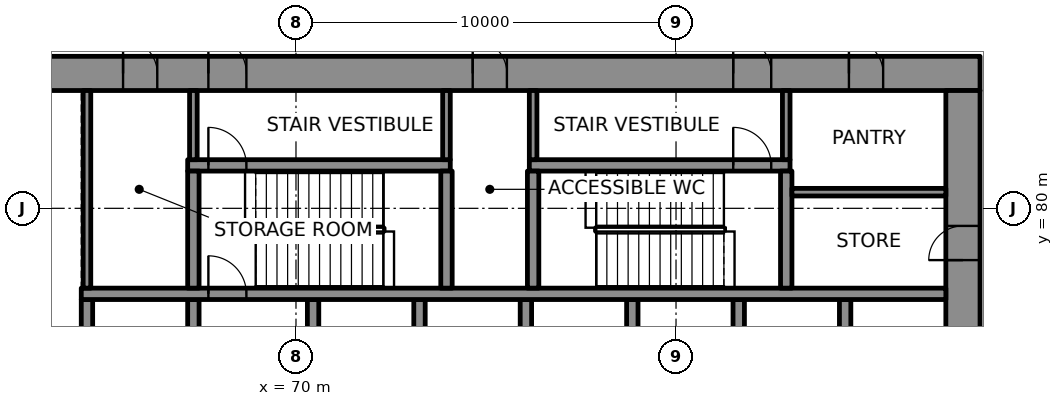
"""IFC4 building model, lengths in metres.
Left out: names, types, materials, properties, quantities, classifications, styles, units other than length and angle.
Written with IfcOpenShell. Run it as: python <this file> out.ifc"""

import sys

from ifc_helpers import new_model, si_unit, direction, frame, frame_2d, origin, place, context, subcontext, project, spatial, rectangle, extrude, element, fill, save


model = new_model("IFC4")
c1 = context("Model", 3, precision=1e-05, world=origin(), true_north=direction((0.0, 1.0)))
c2 = subcontext(c1, "Body", "Model", "MODEL_VIEW")
j1 = project(units=[si_unit("LENGTHUNIT", "METRE"), si_unit("PLANEANGLEUNIT", "RADIAN")], contexts=[c1])
p1 = place(None, origin())
s1 = spatial("IfcSite", under=j1, at=p1, CompositionType="ELEMENT")
p2 = place(p1, origin())
s2 = spatial("IfcBuilding", under=s1, at=p2, CompositionType="ELEMENT")
p3 = place(p2, frame((0.0, 0.0, 8.0)))
s3 = spatial("IfcBuildingStorey", under=s2, at=p3, CompositionType="ELEMENT", Elevation=8.0)
p4 = place(p3, frame((62.0, 83.55, 0.0), z_axis=(0.0, 0.0, 1.0), x_axis=(1.0, 0.0, 0.0)))
e1 = element("IfcWall", 1, at=p4, inside=s3, PredefinedType="SHEAR", context=c2, shape_type="SweptSolid", body=[
    extrude(rectangle(XDim=26.0, YDim=0.9, at=frame_2d((13.0, 0.0))), origin(), (0.0, 0.0, 1.0), 4.3),
])
p5 = place(p4, frame((5.695, 0.0, 0.0)))
e2 = element("IfcOpeningElement", 2, at=p5, cuts=e1, PredefinedType="OPENING", context=c2, shape_type="SweptSolid", body=[
    extrude(rectangle(XDim=1.0, YDim=2.1, at=frame_2d((0.5, 1.05))), frame((0.0, 0.46, 0.0), z_axis=(0.0, -1.0, 0.0), x_axis=(1.0, 0.0, 0.0)), (0.0, 0.0, 1.0), 0.92),
])
p6 = place(p4, frame((19.505, 0.0, 0.0)))
e3 = element("IfcOpeningElement", 3, at=p6, cuts=e1, PredefinedType="OPENING", context=c2, shape_type="SweptSolid", body=[
    extrude(rectangle(XDim=1.0, YDim=2.1, at=frame_2d((0.5, 1.05))), frame((0.0, 0.46, 0.0), z_axis=(0.0, -1.0, 0.0), x_axis=(1.0, 0.0, 0.0)), (0.0, 0.0, 1.0), 0.92),
])
p7 = place(p4, frame((3.45, 0.0, 0.0)))
e4 = element("IfcOpeningElement", 4, at=p7, cuts=e1, PredefinedType="OPENING", context=c2, shape_type="SweptSolid", body=[
    extrude(rectangle(XDim=0.9, YDim=2.1, at=frame_2d((0.45, 1.05))), frame((0.0, 0.46, 0.0), z_axis=(0.0, -1.0, 0.0), x_axis=(1.0, 0.0, 0.0)), (0.0, 0.0, 1.0), 0.92),
])
p8 = place(p4, frame((12.65, 0.0, 0.0)))
e5 = element("IfcOpeningElement", 5, at=p8, cuts=e1, PredefinedType="OPENING", context=c2, shape_type="SweptSolid", body=[
    extrude(rectangle(XDim=0.9, YDim=2.1, at=frame_2d((0.45, 1.05))), frame((0.0, 0.46, 0.0), z_axis=(0.0, -1.0, 0.0), x_axis=(1.0, 0.0, 0.0)), (0.0, 0.0, 1.0), 0.92),
])
p9 = place(p4, frame((22.55, 0.0, 0.0)))
e6 = element("IfcOpeningElement", 6, at=p9, cuts=e1, PredefinedType="OPENING", context=c2, shape_type="SweptSolid", body=[
    extrude(rectangle(XDim=0.9, YDim=2.1, at=frame_2d((0.45, 1.05))), frame((0.0, 0.46, 0.0), z_axis=(0.0, -1.0, 0.0), x_axis=(1.0, 0.0, 0.0)), (0.0, 0.0, 1.0), 0.92),
])
p10 = place(p3, frame((87.55, 66.9, 0.0), z_axis=(0.0, 0.0, 1.0), x_axis=(0.0, 1.0, 0.0)))
e7 = element("IfcWall", 7, at=p10, inside=s3, PredefinedType="SHEAR", context=c2, shape_type="SweptSolid", body=[
    extrude(rectangle(XDim=16.2, YDim=0.9, at=frame_2d((8.1, 0.0))), origin(), (0.0, 0.0, 1.0), 4.3),
])
p11 = place(p10, frame((5.5, 0.0, 0.0)))
e8 = element("IfcOpeningElement", 8, at=p11, cuts=e7, PredefinedType="OPENING", context=c2, shape_type="SweptSolid", body=[
    extrude(rectangle(XDim=1.8, YDim=2.1, at=frame_2d((0.9, 1.05))), frame((0.0, 0.46, 0.0), z_axis=(0.0, -1.0, 0.0), x_axis=(1.0, 0.0, 0.0)), (0.0, 0.0, 1.0), 0.92),
])
p12 = place(p10, frame((11.738, 0.0, 0.0)))
e9 = element("IfcOpeningElement", 9, at=p12, cuts=e7, PredefinedType="OPENING", context=c2, shape_type="SweptSolid", body=[
    extrude(rectangle(XDim=0.9, YDim=2.1, at=frame_2d((0.45, 1.05))), frame((0.0, 0.46, 0.0), z_axis=(0.0, -1.0, 0.0), x_axis=(1.0, 0.0, 0.0)), (0.0, 0.0, 1.0), 0.92),
])
for number, where, z_axis, x_axis in (
    (10, (64.5, 75.0, 0.0), (0.0, 0.0, 1.0), (0.0, 1.0, 0.0)),
    (11, (67.3, 75.0, 0.0), (0.0, 0.0, 1.0), (0.0, 1.0, 0.0)),
):
    element("IfcWall", number, at=place(p3, frame(where, z_axis=z_axis, x_axis=x_axis)), inside=s3, PredefinedType="SHEAR", context=c2, shape_type="SweptSolid", body=[
        extrude(rectangle(XDim=2.6, YDim=0.3, at=frame_2d((1.3, 0.0))), origin(), (0.0, 0.0, 1.0), 4.3),
    ])
p13 = place(p3, frame((70.45, 75.0, 0.0), z_axis=(0.0, 0.0, 1.0), x_axis=(0.0, 1.0, 0.0)))
e12 = element("IfcWall", 12, at=p13, inside=s3, PredefinedType="SHEAR", context=c2, shape_type="SweptSolid", body=[
    extrude(rectangle(XDim=2.6, YDim=0.3, at=frame_2d((1.3, 0.0))), origin(), (0.0, 0.0, 1.0), 4.3),
])
p14 = place(p13, frame((0.15, 0.0, 0.0)))
e13 = element("IfcOpeningElement", 13, at=p14, cuts=e12, PredefinedType="OPENING", context=c2, shape_type="SweptSolid", body=[
    extrude(rectangle(XDim=1.1, YDim=2.1, at=frame_2d((0.55, 1.05))), frame((0.0, 0.16, 0.0), z_axis=(0.0, -1.0, 0.0), x_axis=(1.0, 0.0, 0.0)), (0.0, 0.0, 1.0), 0.32),
])
for number, where, z_axis, x_axis in (
    (14, (73.25, 75.0, 0.0), (0.0, 0.0, 1.0), (0.0, 1.0, 0.0)),
    (15, (76.05, 75.0, 0.0), (0.0, 0.0, 1.0), (0.0, 1.0, 0.0)),
    (16, (78.85, 75.0, 0.0), (0.0, 0.0, 1.0), (0.0, 1.0, 0.0)),
    (17, (81.65, 75.0, 0.0), (0.0, 0.0, 1.0), (0.0, 1.0, 0.0)),
    (18, (84.45, 75.0, 0.0), (0.0, 0.0, 1.0), (0.0, 1.0, 0.0)),
):
    element("IfcWall", number, at=place(p3, frame(where, z_axis=z_axis, x_axis=x_axis)), inside=s3, PredefinedType="SHEAR", context=c2, shape_type="SweptSolid", body=[
        extrude(rectangle(XDim=2.6, YDim=0.3, at=frame_2d((1.3, 0.0))), origin(), (0.0, 0.0, 1.0), 4.3),
    ])
p15 = place(p3, frame((64.35, 77.75, 0.0), z_axis=(0.0, 0.0, 1.0), x_axis=(1.0, 0.0, 0.0)))
e19 = element("IfcWall", 19, at=p15, inside=s3, PredefinedType="SHEAR", context=c2, shape_type="SweptSolid", body=[
    extrude(rectangle(XDim=22.75, YDim=0.3, at=frame_2d((11.375, 0.0))), origin(), (0.0, 0.0, 1.0), 4.3),
])
p16 = place(p15, frame((3.345, 0.0, 0.0)))
e20 = element("IfcOpeningElement", 20, at=p16, cuts=e19, PredefinedType="OPENING", context=c2, shape_type="SweptSolid", body=[
    extrude(rectangle(XDim=1.0, YDim=2.1, at=frame_2d((0.5, 1.05))), frame((0.0, 0.16, 0.0), z_axis=(0.0, -1.0, 0.0), x_axis=(1.0, 0.0, 0.0)), (0.0, 0.0, 1.0), 0.32),
])
p17 = place(p3, frame((67.15, 81.13, 0.0), z_axis=(0.0, 0.0, 1.0), x_axis=(1.0, 0.0, 0.0)))
e21 = element("IfcWall", 21, at=p17, inside=s3, PredefinedType="SHEAR", context=c2, shape_type="SweptSolid", body=[
    extrude(rectangle(XDim=6.91, YDim=0.3, at=frame_2d((3.455, 0.0))), origin(), (0.0, 0.0, 1.0), 4.3),
])
p18 = place(p17, frame((0.545, 0.0, 0.0)))
e22 = element("IfcOpeningElement", 22, at=p18, cuts=e21, PredefinedType="OPENING", context=c2, shape_type="SweptSolid", body=[
    extrude(rectangle(XDim=1.0, YDim=2.1, at=frame_2d((0.5, 1.05))), frame((0.0, 0.16, 0.0), z_axis=(0.0, -1.0, 0.0), x_axis=(1.0, 0.0, 0.0)), (0.0, 0.0, 1.0), 0.32),
])
p19 = place(p3, frame((76.14, 81.13, 0.0), z_axis=(0.0, 0.0, 1.0), x_axis=(1.0, 0.0, 0.0)))
e23 = element("IfcWall", 23, at=p19, inside=s3, PredefinedType="SHEAR", context=c2, shape_type="SweptSolid", body=[
    extrude(rectangle(XDim=6.86, YDim=0.3, at=frame_2d((3.43, 0.0))), origin(), (0.0, 0.0, 1.0), 4.3),
])
p20 = place(p19, frame((5.365, 0.0, 0.0)))
e24 = element("IfcOpeningElement", 24, at=p20, cuts=e23, PredefinedType="OPENING", context=c2, shape_type="SweptSolid", body=[
    extrude(rectangle(XDim=1.0, YDim=2.1, at=frame_2d((0.5, 1.05))), frame((0.0, 0.16, 0.0), z_axis=(0.0, -1.0, 0.0), x_axis=(1.0, 0.0, 0.0)), (0.0, 0.0, 1.0), 0.32),
])
for number, where, z_axis, x_axis in (
    (25, (67.3, 77.9, 0.0), (0.0, 0.0, 1.0), (0.0, 1.0, 0.0)),
    (26, (73.96, 77.9, 0.0), (0.0, 0.0, 1.0), (0.0, 1.0, 0.0)),
    (27, (76.24, 77.9, 0.0), (0.0, 0.0, 1.0), (0.0, 1.0, 0.0)),
    (28, (82.9, 77.9, 0.0), (0.0, 0.0, 1.0), (0.0, 1.0, 0.0)),
):
    element("IfcWall", number, at=place(p3, frame(where, z_axis=z_axis, x_axis=x_axis)), inside=s3, PredefinedType="SHEAR", context=c2, shape_type="SweptSolid", body=[
        extrude(rectangle(XDim=3.08, YDim=0.3, at=frame_2d((1.54, 0.0))), origin(), (0.0, 0.0, 1.0), 4.3),
    ])
p21 = place(p3, frame((83.05, 80.425, 0.0), z_axis=(0.0, 0.0, 1.0), x_axis=(1.0, 0.0, 0.0)))
e29 = element("IfcWall", 29, at=p21, inside=s3, PredefinedType="PARTITIONING", context=c2, shape_type="SweptSolid", body=[
    extrude(rectangle(XDim=4.05, YDim=0.2, at=frame_2d((2.025, 0.0))), origin(), (0.0, 0.0, 1.0), 4.3),
])
p22 = place(p3, frame((64.5, 77.9, 0.0), z_axis=(0.0, 0.0, 1.0), x_axis=(0.0, 1.0, 0.0)))
e30 = element("IfcWall", 30, at=p22, inside=s3, PredefinedType="PARTITIONING", context=c2, shape_type="SweptSolid", body=[
    extrude(rectangle(XDim=5.2, YDim=0.2, at=frame_2d((2.6, 0.0))), origin(), (0.0, 0.0, 1.0), 4.3),
])
for number, where, z_axis, x_axis in (
    (31, (67.3, 81.28, 0.0), (0.0, 0.0, 1.0), (0.0, 1.0, 0.0)),
    (32, (73.96, 81.28, 0.0), (0.0, 0.0, 1.0), (0.0, 1.0, 0.0)),
    (33, (76.24, 81.28, 0.0), (0.0, 0.0, 1.0), (0.0, 1.0, 0.0)),
    (34, (82.9, 81.28, 0.0), (0.0, 0.0, 1.0), (0.0, 1.0, 0.0)),
):
    element("IfcWall", number, at=place(p3, frame(where, z_axis=z_axis, x_axis=x_axis)), inside=s3, PredefinedType="PARTITIONING", context=c2, shape_type="SweptSolid", body=[
        extrude(rectangle(XDim=1.82, YDim=0.2, at=frame_2d((0.91, 0.0))), origin(), (0.0, 0.0, 1.0), 4.3),
    ])
p23 = place(p3, frame((107.106, 62.36, 0.0), z_axis=(0.0, 0.0, 1.0), x_axis=(-0.49999992739, 0.866025445706, 0.0)))
e35 = element("IfcWall", 35, at=p23, inside=s3, PredefinedType="SOLIDWALL", context=c2, shape_type="SweptSolid", body=[
    extrude(rectangle(XDim=54.0, YDim=0.4, at=frame_2d((27.0, 0.0))), origin(), (0.0, 0.0, 1.0), 4.24),
])
p24 = place(p3, frame((112.496, 65.725, 0.0), z_axis=(0.0, 0.0, 1.0), x_axis=(-0.499998673217, 0.866026169802, 0.0)))
e36 = element("IfcWall", 36, at=p24, inside=s3, PredefinedType="PARTITIONING", context=c2, shape_type="SweptSolid", body=[
    extrude(rectangle(XDim=53.48, YDim=0.2, at=frame_2d((26.74, 0.0))), origin(), (0.0, 0.0, 1.0), 4.24),
])
p25 = place(p24, frame((13.08, 0.0, 0.0)))
e37 = element("IfcOpeningElement", 37, at=p25, cuts=e36, PredefinedType="OPENING", context=c2, shape_type="SweptSolid", body=[
    extrude(rectangle(XDim=1.0, YDim=2.1, at=frame_2d((0.5, 1.05))), frame((0.0, 0.11, 0.0), z_axis=(0.0, -1.0, 0.0), x_axis=(1.0, 0.0, 0.0)), (0.0, 0.0, 1.0), 0.22),
])
p26 = place(p24, frame((25.88, 0.0, 0.0)))
e38 = element("IfcOpeningElement", 38, at=p26, cuts=e36, PredefinedType="OPENING", context=c2, shape_type="SweptSolid", body=[
    extrude(rectangle(XDim=1.8, YDim=2.1, at=frame_2d((0.9, 1.05))), frame((0.0, 0.11, 0.0), z_axis=(0.0, -1.0, 0.0), x_axis=(1.0, 0.0, 0.0)), (0.0, 0.0, 1.0), 0.22),
])
p27 = place(p24, frame((50.58, 0.0, 0.0)))
e39 = element("IfcOpeningElement", 39, at=p27, cuts=e36, PredefinedType="OPENING", context=c2, shape_type="SweptSolid", body=[
    extrude(rectangle(XDim=1.0, YDim=2.1, at=frame_2d((0.5, 1.05))), frame((0.0, 0.11, 0.0), z_axis=(0.0, -1.0, 0.0), x_axis=(1.0, 0.0, 0.0)), (0.0, 0.0, 1.0), 0.22),
])
p28 = place(p24, frame((44.28, 0.0, 0.0)))
e40 = element("IfcOpeningElement", 40, at=p28, cuts=e36, PredefinedType="OPENING", context=c2, shape_type="SweptSolid", body=[
    extrude(rectangle(XDim=1.0, YDim=2.1, at=frame_2d((0.5, 1.05))), frame((0.0, 0.11, 0.0), z_axis=(0.0, -1.0, 0.0), x_axis=(1.0, 0.0, 0.0)), (0.0, 0.0, 1.0), 0.22),
])
p29 = place(p16, origin())
e41 = element("IfcDoor", 41, at=p29, inside=s3, OperationType="SINGLE_SWING_LEFT", PredefinedType="DOOR", context=c2, shape_type="SweptSolid", body=[
    extrude(rectangle(XDim=1.0, YDim=2.1, at=frame_2d((0.5, 1.05))), frame((0.0, 0.025, 0.0), z_axis=(0.0, -1.0, 0.0), x_axis=(1.0, 0.0, 0.0)), (0.0, 0.0, 1.0), 0.05),
])
fill(e20, e41)
p30 = place(p18, origin())
e42 = element("IfcDoor", 42, at=p30, inside=s3, OperationType="SINGLE_SWING_RIGHT", PredefinedType="DOOR", context=c2, shape_type="SweptSolid", body=[
    extrude(rectangle(XDim=1.0, YDim=2.1, at=frame_2d((0.5, 1.05))), frame((0.0, 0.025, 0.0), z_axis=(0.0, -1.0, 0.0), x_axis=(1.0, 0.0, 0.0)), (0.0, 0.0, 1.0), 0.05),
])
fill(e22, e42)
p31 = place(p5, origin())
e43 = element("IfcDoor", 43, at=p31, inside=s3, OperationType="SINGLE_SWING_LEFT", PredefinedType="DOOR", context=c2, shape_type="SweptSolid", body=[
    extrude(rectangle(XDim=1.0, YDim=2.1, at=frame_2d((0.5, 1.05))), frame((0.0, 0.17, 0.0), z_axis=(0.0, -1.0, 0.0), x_axis=(1.0, 0.0, 0.0)), (0.0, 0.0, 1.0), 0.34),
])
fill(e2, e43)
p32 = place(p20, origin())
e44 = element("IfcDoor", 44, at=p32, inside=s3, OperationType="SINGLE_SWING_RIGHT", PredefinedType="DOOR", context=c2, shape_type="SweptSolid", body=[
    extrude(rectangle(XDim=1.0, YDim=2.1, at=frame_2d((0.5, 1.05))), frame((0.0, 0.025, 0.0), z_axis=(0.0, -1.0, 0.0), x_axis=(1.0, 0.0, 0.0)), (0.0, 0.0, 1.0), 0.05),
])
fill(e24, e44)
p33 = place(p6, origin())
e45 = element("IfcDoor", 45, at=p33, inside=s3, OperationType="SINGLE_SWING_LEFT", PredefinedType="DOOR", context=c2, shape_type="SweptSolid", body=[
    extrude(rectangle(XDim=1.0, YDim=2.1, at=frame_2d((0.5, 1.05))), frame((0.0, 0.17, 0.0), z_axis=(0.0, -1.0, 0.0), x_axis=(1.0, 0.0, 0.0)), (0.0, 0.0, 1.0), 0.34),
])
fill(e3, e45)
p34 = place(p7, origin())
e46 = element("IfcDoor", 46, at=p34, inside=s3, OperationType="SINGLE_SWING_RIGHT", PredefinedType="DOOR", context=c2, shape_type="SweptSolid", body=[
    extrude(rectangle(XDim=0.9, YDim=2.1, at=frame_2d((0.45, 1.05))), frame((0.0, 0.17, 0.0), z_axis=(0.0, -1.0, 0.0), x_axis=(1.0, 0.0, 0.0)), (0.0, 0.0, 1.0), 0.34),
])
fill(e4, e46)
p35 = place(p8, origin())
e47 = element("IfcDoor", 47, at=p35, inside=s3, OperationType="SINGLE_SWING_LEFT", PredefinedType="DOOR", context=c2, shape_type="SweptSolid", body=[
    extrude(rectangle(XDim=0.9, YDim=2.1, at=frame_2d((0.45, 1.05))), frame((0.0, 0.17, 0.0), z_axis=(0.0, -1.0, 0.0), x_axis=(1.0, 0.0, 0.0)), (0.0, 0.0, 1.0), 0.34),
])
fill(e5, e47)
p36 = place(p12, origin())
e48 = element("IfcDoor", 48, at=p36, inside=s3, OperationType="SINGLE_SWING_RIGHT", PredefinedType="DOOR", context=c2, shape_type="SweptSolid", body=[
    extrude(rectangle(XDim=0.9, YDim=2.1, at=frame_2d((0.45, 1.05))), frame((0.0, 0.17, 0.0), z_axis=(0.0, -1.0, 0.0), x_axis=(1.0, 0.0, 0.0)), (0.0, 0.0, 1.0), 0.34),
])
fill(e9, e48)
p37 = place(p9, origin())
e49 = element("IfcDoor", 49, at=p37, inside=s3, OperationType="SINGLE_SWING_LEFT", PredefinedType="DOOR", context=c2, shape_type="SweptSolid", body=[
    extrude(rectangle(XDim=0.9, YDim=2.1, at=frame_2d((0.45, 1.05))), frame((0.0, 0.17, 0.0), z_axis=(0.0, -1.0, 0.0), x_axis=(1.0, 0.0, 0.0)), (0.0, 0.0, 1.0), 0.34),
])
fill(e6, e49)
save(model, sys.argv[1])
